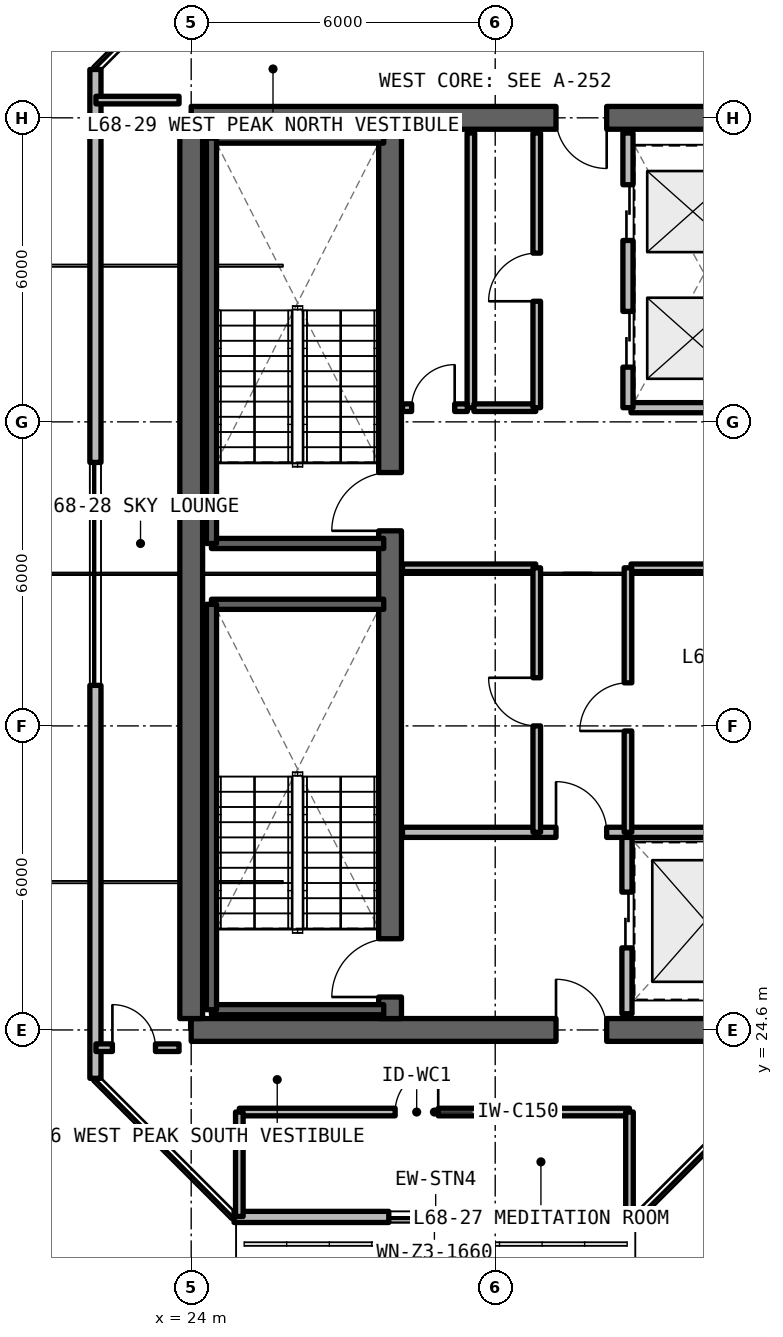
"""IFC4 building model, lengths in metres.
Left out: names, types, materials, properties, quantities, classifications, styles, units other than length and angle.
Written with IfcOpenShell. Run it as: python <this file> out.ifc"""

import sys

from ifc_helpers import new_model, si_unit, direction, frame, frame_2d, origin, place, context, subcontext, project, spatial, rectangle, extrude, element, fill, save


model = new_model("IFC4")
c1 = context("Model", 3, precision=1e-05, world=origin(), true_north=direction((0.0, 1.0)))
c2 = subcontext(c1, "Body", "Model", "MODEL_VIEW")
j1 = project(units=[si_unit("LENGTHUNIT", "METRE"), si_unit("PLANEANGLEUNIT", "RADIAN")], contexts=[c1])
p1 = place(None, origin())
s1 = spatial("IfcSite", under=j1, at=p1, CompositionType="ELEMENT")
p2 = place(p1, origin())
s2 = spatial("IfcBuilding", under=s1, at=p2, CompositionType="ELEMENT")
p3 = place(p2, frame((0.0, 0.0, 242.55)))
s3 = spatial("IfcBuildingStorey", under=s2, at=p3, CompositionType="ELEMENT", Elevation=242.55)
p4 = place(p3, frame((24.0, 24.6, 0.0), z_axis=(0.0, 0.0, 1.0), x_axis=(1.0, 0.0, 0.0)))
e1 = element("IfcWall", 1, at=p4, inside=s3, PredefinedType="SHEAR", context=c2, shape_type="SweptSolid", body=[
    extrude(rectangle(XDim=12.0, YDim=0.45, at=frame_2d((6.0, 0.0))), origin(), (0.0, 0.0, 1.0), 3.63),
])
p5 = place(p4, frame((7.2, 0.0, 0.0)))
e2 = element("IfcOpeningElement", 2, at=p5, cuts=e1, PredefinedType="OPENING", context=c2, shape_type="SweptSolid", body=[
    extrude(rectangle(XDim=1.0, YDim=2.15, at=frame_2d((0.5, 1.075))), frame((0.0, 0.235, 0.0), z_axis=(0.0, -1.0, 0.0), x_axis=(1.0, 0.0, 0.0)), (0.0, 0.0, 1.0), 0.47),
])
p6 = place(p3, frame((36.0, 42.6, 0.0), z_axis=(0.0, 0.0, 1.0), x_axis=(-1.0, 0.0, 0.0)))
e3 = element("IfcWall", 3, at=p6, inside=s3, PredefinedType="SHEAR", context=c2, shape_type="SweptSolid", body=[
    extrude(rectangle(XDim=12.0, YDim=0.45, at=frame_2d((6.0, 0.0))), origin(), (0.0, 0.0, 1.0), 3.63),
])
p7 = place(p6, frame((3.8, 0.0, 0.0)))
e4 = element("IfcOpeningElement", 4, at=p7, cuts=e3, PredefinedType="OPENING", context=c2, shape_type="SweptSolid", body=[
    extrude(rectangle(XDim=1.0, YDim=2.15, at=frame_2d((0.5, 1.075))), frame((0.0, 0.235, 0.0), z_axis=(0.0, -1.0, 0.0), x_axis=(1.0, 0.0, 0.0)), (0.0, 0.0, 1.0), 0.47),
])
p8 = place(p3, frame((24.0, 24.825, 0.0), z_axis=(0.0, 0.0, 1.0), x_axis=(0.0, 1.0, 0.0)))
e5 = element("IfcWall", 5, at=p8, inside=s3, PredefinedType="SHEAR", context=c2, shape_type="SweptSolid", body=[
    extrude(rectangle(XDim=17.55, YDim=0.45, at=frame_2d((8.775, 0.0))), origin(), (0.0, 0.0, 1.0), 3.63),
])
p9 = place(p3, frame((27.925, 24.825, 0.0), z_axis=(0.0, 0.0, 1.0), x_axis=(0.0, 1.0, 0.0)))
e6 = element("IfcWall", 6, at=p9, inside=s3, PredefinedType="SHEAR", context=c2, shape_type="SweptSolid", body=[
    extrude(rectangle(XDim=17.55, YDim=0.45, at=frame_2d((8.775, 0.0))), origin(), (0.0, 0.0, 1.0), 3.63),
])
p10 = place(p9, frame((0.425, 0.0, 0.0)))
e7 = element("IfcOpeningElement", 7, at=p10, cuts=e6, PredefinedType="OPENING", context=c2, shape_type="SweptSolid", body=[
    extrude(rectangle(XDim=1.15, YDim=2.15, at=frame_2d((0.575, 1.075))), frame((0.0, 0.235, 0.0), z_axis=(0.0, -1.0, 0.0), x_axis=(1.0, 0.0, 0.0)), (0.0, 0.0, 1.0), 0.47),
])
p11 = place(p9, frame((9.625, 0.0, 0.0)))
e8 = element("IfcOpeningElement", 8, at=p11, cuts=e6, PredefinedType="OPENING", context=c2, shape_type="SweptSolid", body=[
    extrude(rectangle(XDim=1.15, YDim=2.15, at=frame_2d((0.575, 1.075))), frame((0.0, 0.235, 0.0), z_axis=(0.0, -1.0, 0.0), x_axis=(1.0, 0.0, 0.0)), (0.0, 0.0, 1.0), 0.47),
])
p12 = place(p3, frame((24.846, 20.91, 0.0), z_axis=(0.0, 0.0, 1.0), x_axis=(1.0, 0.0, 0.0)))
e9 = element("IfcWall", 9, at=p12, inside=s3, PredefinedType="SOLIDWALL", context=c2, shape_type="SweptSolid", body=[
    extrude(rectangle(XDim=7.959, YDim=0.22, at=frame_2d((3.979, 0.0))), origin(), (0.0, 0.0, 1.0), 3.41),
])
p13 = place(p12, frame((3.054, 0.0, 0.78)))
e10 = element("IfcOpeningElement", 10, at=p13, cuts=e9, PredefinedType="OPENING", context=c2, shape_type="SweptSolid", body=[
    extrude(rectangle(XDim=1.8, YDim=1.66, at=frame_2d((0.9, 0.83))), frame((0.0, 0.12, 0.0), z_axis=(0.0, -1.0, 0.0), x_axis=(1.0, 0.0, 0.0)), (0.0, 0.0, 1.0), 0.24),
])
p14 = place(p3, frame((22.11, 43.554, 0.0), z_axis=(0.0, 0.0, 1.0), x_axis=(0.0, -1.0, 0.0)))
e11 = element("IfcWall", 11, at=p14, inside=s3, PredefinedType="SOLIDWALL", context=c2, shape_type="SweptSolid", body=[
    extrude(rectangle(XDim=19.909, YDim=0.22, at=frame_2d((9.955, 0.0))), origin(), (0.0, 0.0, 1.0), 3.41),
])
p15 = place(p14, frame((7.754, 0.0, 0.78)))
e12 = element("IfcOpeningElement", 12, at=p15, cuts=e11, PredefinedType="OPENING", context=c2, shape_type="SweptSolid", body=[
    extrude(rectangle(XDim=4.4, YDim=1.66, at=frame_2d((2.2, 0.83))), frame((0.0, 0.12, 0.0), z_axis=(0.0, -1.0, 0.0), x_axis=(1.0, 0.0, 0.0)), (0.0, 0.0, 1.0), 0.24),
])
p16 = place(p3, frame((32.6, 24.92, 0.0), z_axis=(0.0, 0.0, 1.0), x_axis=(0.0, 1.0, 0.0)))
e13 = element("IfcWall", 13, at=p16, inside=s3, PredefinedType="SOLIDWALL", context=c2, shape_type="SweptSolid", body=[
    extrude(rectangle(XDim=3.58, YDim=0.2, at=frame_2d((1.79, 0.0))), origin(), (0.0, 0.0, 1.0), 2.63),
])
p17 = place(p16, frame((1.3, 0.0, 0.0)))
e14 = element("IfcOpeningElement", 14, at=p17, cuts=e13, PredefinedType="OPENING", context=c2, shape_type="SweptSolid", body=[
    extrude(rectangle(XDim=1.1, YDim=2.2, at=frame_2d((0.55, 1.1))), frame((0.0, 0.11, 0.0), z_axis=(0.0, -1.0, 0.0), x_axis=(1.0, 0.0, 0.0)), (0.0, 0.0, 1.0), 0.22),
])
p18 = place(p3, frame((28.17, 28.5, 0.0), z_axis=(0.0, 0.0, 1.0), x_axis=(1.0, 0.0, 0.0)))
e15 = element("IfcWall", 15, at=p18, inside=s3, PredefinedType="SOLIDWALL", context=c2, shape_type="SweptSolid", body=[
    extrude(rectangle(XDim=7.585, YDim=0.2, at=frame_2d((3.792, 0.0))), origin(), (0.0, 0.0, 1.0), 2.63),
])
p19 = place(p18, frame((3.03, 0.0, 0.0)))
e16 = element("IfcOpeningElement", 16, at=p19, cuts=e15, PredefinedType="OPENING", context=c2, shape_type="SweptSolid", body=[
    extrude(rectangle(XDim=1.0, YDim=2.15, at=frame_2d((0.5, 1.075))), frame((0.0, 0.11, 0.0), z_axis=(0.0, -1.0, 0.0), x_axis=(1.0, 0.0, 0.0)), (0.0, 0.0, 1.0), 0.22),
])
p20 = place(p3, frame((28.17, 33.72, 0.0), z_axis=(0.0, 0.0, 1.0), x_axis=(1.0, 0.0, 0.0)))
e17 = element("IfcWall", 17, at=p20, inside=s3, PredefinedType="SOLIDWALL", context=c2, shape_type="SweptSolid", body=[
    extrude(rectangle(XDim=2.63, YDim=0.15, at=frame_2d((1.315, 0.0))), origin(), (0.0, 0.0, 1.0), 2.63),
])
p21 = place(p3, frame((30.82, 28.5, 0.0), z_axis=(0.0, 0.0, 1.0), x_axis=(0.0, 1.0, 0.0)))
e18 = element("IfcWall", 18, at=p21, inside=s3, PredefinedType="SOLIDWALL", context=c2, shape_type="SweptSolid", body=[
    extrude(rectangle(XDim=5.22, YDim=0.15, at=frame_2d((2.61, 0.0))), origin(), (0.0, 0.0, 1.0), 2.63),
])
p22 = place(p21, frame((2.1, 0.0, 0.0)))
e19 = element("IfcOpeningElement", 19, at=p22, cuts=e18, PredefinedType="OPENING", context=c2, shape_type="SweptSolid", body=[
    extrude(rectangle(XDim=0.95, YDim=2.15, at=frame_2d((0.475, 1.075))), frame((0.0, 0.085, 0.0), z_axis=(0.0, -1.0, 0.0), x_axis=(1.0, 0.0, 0.0)), (0.0, 0.0, 1.0), 0.17),
])
p23 = place(p3, frame((32.68, 33.72, 0.0), z_axis=(0.0, 0.0, 1.0), x_axis=(1.0, 0.0, 0.0)))
e20 = element("IfcWall", 20, at=p23, inside=s3, PredefinedType="SOLIDWALL", context=c2, shape_type="SweptSolid", body=[
    extrude(rectangle(XDim=3.075, YDim=0.15, at=frame_2d((1.538, 0.0))), origin(), (0.0, 0.0, 1.0), 2.63),
])
p24 = place(p3, frame((32.62, 28.5, 0.0), z_axis=(0.0, 0.0, 1.0), x_axis=(0.0, 1.0, 0.0)))
e21 = element("IfcWall", 21, at=p24, inside=s3, PredefinedType="SOLIDWALL", context=c2, shape_type="SweptSolid", body=[
    extrude(rectangle(XDim=5.22, YDim=0.15, at=frame_2d((2.61, 0.0))), origin(), (0.0, 0.0, 1.0), 2.63),
])
p25 = place(p24, frame((2.0, 0.0, 0.0)))
e22 = element("IfcOpeningElement", 22, at=p25, cuts=e21, PredefinedType="OPENING", context=c2, shape_type="SweptSolid", body=[
    extrude(rectangle(XDim=0.95, YDim=2.15, at=frame_2d((0.475, 1.075))), frame((0.0, 0.085, 0.0), z_axis=(0.0, -1.0, 0.0), x_axis=(1.0, 0.0, 0.0)), (0.0, 0.0, 1.0), 0.17),
])
p26 = place(p3, frame((29.52, 36.88, 0.0), z_axis=(0.0, 0.0, 1.0), x_axis=(0.0, 1.0, 0.0)))
e23 = element("IfcWall", 23, at=p26, inside=s3, PredefinedType="SOLIDWALL", context=c2, shape_type="SweptSolid", body=[
    extrude(rectangle(XDim=5.42, YDim=0.15, at=frame_2d((2.71, 0.0))), origin(), (0.0, 0.0, 1.0), 2.63),
])
p27 = place(p3, frame((28.17, 36.88, 0.0), z_axis=(0.0, 0.0, 1.0), x_axis=(1.0, 0.0, 0.0)))
e24 = element("IfcWall", 24, at=p27, inside=s3, PredefinedType="SOLIDWALL", context=c2, shape_type="SweptSolid", body=[
    extrude(rectangle(XDim=1.28, YDim=0.15, at=frame_2d((0.64, 0.0))), origin(), (0.0, 0.0, 1.0), 2.63),
])
p28 = place(p27, frame((0.18, 0.0, 0.0)))
e25 = element("IfcOpeningElement", 25, at=p28, cuts=e24, PredefinedType="OPENING", context=c2, shape_type="SweptSolid", body=[
    extrude(rectangle(XDim=0.85, YDim=2.1, at=frame_2d((0.425, 1.05))), frame((0.0, 0.085, 0.0), z_axis=(0.0, -1.0, 0.0), x_axis=(1.0, 0.0, 0.0)), (0.0, 0.0, 1.0), 0.17),
])
p29 = place(p3, frame((29.58, 36.88, 0.0), z_axis=(0.0, 0.0, 1.0), x_axis=(1.0, 0.0, 0.0)))
e26 = element("IfcWall", 26, at=p29, inside=s3, PredefinedType="SOLIDWALL", context=c2, shape_type="SweptSolid", body=[
    extrude(rectangle(XDim=1.22, YDim=0.15, at=frame_2d((0.61, 0.0))), origin(), (0.0, 0.0, 1.0), 2.63),
])
p30 = place(p3, frame((30.82, 36.88, 0.0), z_axis=(0.0, 0.0, 1.0), x_axis=(0.0, 1.0, 0.0)))
e27 = element("IfcWall", 27, at=p30, inside=s3, PredefinedType="SOLIDWALL", context=c2, shape_type="SweptSolid", body=[
    extrude(rectangle(XDim=5.42, YDim=0.15, at=frame_2d((2.71, 0.0))), origin(), (0.0, 0.0, 1.0), 2.63),
])
p31 = place(p30, frame((2.1, 0.0, 0.0)))
e28 = element("IfcOpeningElement", 28, at=p31, cuts=e27, PredefinedType="OPENING", context=c2, shape_type="SweptSolid", body=[
    extrude(rectangle(XDim=0.95, YDim=2.15, at=frame_2d((0.475, 1.075))), frame((0.0, 0.085, 0.0), z_axis=(0.0, -1.0, 0.0), x_axis=(1.0, 0.0, 0.0)), (0.0, 0.0, 1.0), 0.17),
])
p32 = place(p3, frame((32.68, 36.88, 0.0), z_axis=(0.0, 0.0, 1.0), x_axis=(1.0, 0.0, 0.0)))
e29 = element("IfcWall", 29, at=p32, inside=s3, PredefinedType="SOLIDWALL", context=c2, shape_type="SweptSolid", body=[
    extrude(rectangle(XDim=3.075, YDim=0.2, at=frame_2d((1.538, 0.0))), origin(), (0.0, 0.0, 1.0), 2.63),
])
p33 = place(p3, frame((32.62, 36.88, 0.0), z_axis=(0.0, 0.0, 1.0), x_axis=(0.0, 1.0, 0.0)))
e30 = element("IfcWall", 30, at=p33, inside=s3, PredefinedType="SOLIDWALL", context=c2, shape_type="SweptSolid", body=[
    extrude(rectangle(XDim=5.42, YDim=0.2, at=frame_2d((2.71, 0.0))), origin(), (0.0, 0.0, 1.0), 2.63),
])
p34 = place(p33, frame((0.8, 0.0, 0.0)))
e31 = element("IfcOpeningElement", 31, at=p34, cuts=e30, PredefinedType="OPENING", context=c2, shape_type="SweptSolid", body=[
    extrude(rectangle(XDim=1.1, YDim=2.2, at=frame_2d((0.55, 1.1))), frame((0.0, 0.11, 0.0), z_axis=(0.0, -1.0, 0.0), x_axis=(1.0, 0.0, 0.0)), (0.0, 0.0, 1.0), 0.22),
])
p35 = place(p33, frame((3.3, 0.0, 0.0)))
e32 = element("IfcOpeningElement", 32, at=p35, cuts=e30, PredefinedType="OPENING", context=c2, shape_type="SweptSolid", body=[
    extrude(rectangle(XDim=1.1, YDim=2.2, at=frame_2d((0.55, 1.1))), frame((0.0, 0.11, 0.0), z_axis=(0.0, -1.0, 0.0), x_axis=(1.0, 0.0, 0.0)), (0.0, 0.0, 1.0), 0.22),
])
p36 = place(p3, frame((24.95, 22.98, 0.0), z_axis=(0.0, 0.0, 1.0), x_axis=(1.0, 0.0, 0.0)))
e33 = element("IfcWall", 33, at=p36, inside=s3, PredefinedType="SOLIDWALL", context=c2, shape_type="SweptSolid", body=[
    extrude(rectangle(XDim=7.7, YDim=0.15, at=frame_2d((3.85, 0.0))), origin(), (0.0, 0.0, 1.0), 2.63),
])
p37 = place(p36, frame((3.075, 0.0, 0.0)))
e34 = element("IfcOpeningElement", 34, at=p37, cuts=e33, PredefinedType="OPENING", context=c2, shape_type="SweptSolid", body=[
    extrude(rectangle(XDim=0.85, YDim=2.1, at=frame_2d((0.425, 1.05))), frame((0.0, 0.085, 0.0), z_axis=(0.0, -1.0, 0.0), x_axis=(1.0, 0.0, 0.0)), (0.0, 0.0, 1.0), 0.17),
])
for number, where, z_axis, x_axis in (
    (35, (24.95, 20.92, 0.0), (0.0, 0.0, 1.0), (0.0, 1.0, 0.0)),
    (36, (32.65, 20.92, 0.0), (0.0, 0.0, 1.0), (0.0, 1.0, 0.0)),
):
    element("IfcWall", number, at=place(p3, frame(where, z_axis=z_axis, x_axis=x_axis)), inside=s3, PredefinedType="SOLIDWALL", context=c2, shape_type="SweptSolid", body=[
        extrude(rectangle(XDim=2.06, YDim=0.15, at=frame_2d((1.03, 0.0))), origin(), (0.0, 0.0, 1.0), 2.63),
    ])
p38 = place(p3, frame((22.12, 24.25, 0.0), z_axis=(0.0, 0.0, 1.0), x_axis=(1.0, 0.0, 0.0)))
e37 = element("IfcWall", 37, at=p38, inside=s3, PredefinedType="SOLIDWALL", context=c2, shape_type="SweptSolid", body=[
    extrude(rectangle(XDim=1.64, YDim=0.15, at=frame_2d((0.82, 0.0))), origin(), (0.0, 0.0, 1.0), 2.63),
])
p39 = place(p38, frame((0.325, 0.0, 0.0)))
e38 = element("IfcOpeningElement", 38, at=p39, cuts=e37, PredefinedType="OPENING", context=c2, shape_type="SweptSolid", body=[
    extrude(rectangle(XDim=0.85, YDim=2.1, at=frame_2d((0.425, 1.05))), frame((0.0, 0.085, 0.0), z_axis=(0.0, -1.0, 0.0), x_axis=(1.0, 0.0, 0.0)), (0.0, 0.0, 1.0), 0.17),
])
p40 = place(p3, frame((22.12, 42.95, 0.0), z_axis=(0.0, 0.0, 1.0), x_axis=(1.0, 0.0, 0.0)))
e39 = element("IfcWall", 39, at=p40, inside=s3, PredefinedType="SOLIDWALL", context=c2, shape_type="SweptSolid", body=[
    extrude(rectangle(XDim=1.64, YDim=0.15, at=frame_2d((0.82, 0.0))), origin(), (0.0, 0.0, 1.0), 2.63),
])
for number, where, z_axis, x_axis in (
    (40, (24.4, 25.0, 0.0), (0.0, 0.0, 1.0), (1.0, 0.0, 0.0)),
    (41, (27.8, 33.0, 0.0), (0.0, 0.0, 1.0), (-1.0, 0.0, 0.0)),
):
    element("IfcWall", number, at=place(p3, frame(where, z_axis=z_axis, x_axis=x_axis)), inside=s3, PredefinedType="SOLIDWALL", context=c2, shape_type="SweptSolid", body=[
        extrude(rectangle(XDim=3.4, YDim=0.2, at=frame_2d((1.7, 0.0))), origin(), (0.0, 0.0, 1.0), 3.63),
    ])
p41 = place(p3, frame((24.4, 33.0, 0.0), z_axis=(0.0, 0.0, 1.0), x_axis=(0.0, -1.0, 0.0)))
e42 = element("IfcWall", 42, at=p41, inside=s3, PredefinedType="SOLIDWALL", context=c2, shape_type="SweptSolid", body=[
    extrude(rectangle(XDim=8.0, YDim=0.2, at=frame_2d((4.0, 0.0))), origin(), (0.0, 0.0, 1.0), 3.63),
])
for number, where, z_axis, x_axis in (
    (43, (24.4, 34.2, 0.0), (0.0, 0.0, 1.0), (1.0, 0.0, 0.0)),
    (44, (27.8, 42.2, 0.0), (0.0, 0.0, 1.0), (-1.0, 0.0, 0.0)),
):
    element("IfcWall", number, at=place(p3, frame(where, z_axis=z_axis, x_axis=x_axis)), inside=s3, PredefinedType="SOLIDWALL", context=c2, shape_type="SweptSolid", body=[
        extrude(rectangle(XDim=3.4, YDim=0.2, at=frame_2d((1.7, 0.0))), origin(), (0.0, 0.0, 1.0), 3.63),
    ])
p42 = place(p3, frame((24.4, 42.2, 0.0), z_axis=(0.0, 0.0, 1.0), x_axis=(0.0, -1.0, 0.0)))
e45 = element("IfcWall", 45, at=p42, inside=s3, PredefinedType="SOLIDWALL", context=c2, shape_type="SweptSolid", body=[
    extrude(rectangle(XDim=8.0, YDim=0.2, at=frame_2d((4.0, 0.0))), origin(), (0.0, 0.0, 1.0), 3.63),
])
p43 = place(p13, origin())
e46 = element("IfcWindow", 46, at=p43, inside=s3, PartitioningType="SINGLE_PANEL", PredefinedType="WINDOW", context=c2, shape_type="SweptSolid", body=[
    extrude(rectangle(XDim=1.8, YDim=1.66, at=frame_2d((0.9, 0.83))), frame((0.0, 0.03, 0.0), z_axis=(0.0, -1.0, 0.0), x_axis=(1.0, 0.0, 0.0)), (0.0, 0.0, 1.0), 0.06),
])
fill(e10, e46)
p44 = place(p15, origin())
e47 = element("IfcWindow", 47, at=p44, inside=s3, PartitioningType="SINGLE_PANEL", PredefinedType="WINDOW", context=c2, shape_type="SweptSolid", body=[
    extrude(rectangle(XDim=4.4, YDim=1.66, at=frame_2d((2.2, 0.83))), frame((0.0, 0.03, 0.0), z_axis=(0.0, -1.0, 0.0), x_axis=(1.0, 0.0, 0.0)), (0.0, 0.0, 1.0), 0.06),
])
fill(e12, e47)
p45 = place(p17, origin())
e48 = element("IfcDoor", 48, at=p45, inside=s3, OperationType="SLIDING_TO_LEFT", PredefinedType="DOOR", context=c2, shape_type="SweptSolid", body=[
    extrude(rectangle(XDim=1.1, YDim=2.2, at=frame_2d((0.55, 1.1))), frame((0.0, 0.025, 0.0), z_axis=(0.0, -1.0, 0.0), x_axis=(1.0, 0.0, 0.0)), (0.0, 0.0, 1.0), 0.05),
])
fill(e14, e48)
p46 = place(p19, origin())
e49 = element("IfcDoor", 49, at=p46, inside=s3, OperationType="SINGLE_SWING_LEFT", PredefinedType="DOOR", context=c2, shape_type="SweptSolid", body=[
    extrude(rectangle(XDim=1.0, YDim=2.15, at=frame_2d((0.5, 1.075))), frame((0.0, 0.025, 0.0), z_axis=(0.0, -1.0, 0.0), x_axis=(1.0, 0.0, 0.0)), (0.0, 0.0, 1.0), 0.05),
])
fill(e16, e49)
p47 = place(p22, origin())
e50 = element("IfcDoor", 50, at=p47, inside=s3, OperationType="SINGLE_SWING_RIGHT", PredefinedType="DOOR", context=c2, shape_type="SweptSolid", body=[
    extrude(rectangle(XDim=0.95, YDim=2.15, at=frame_2d((0.475, 1.075))), frame((0.0, 0.025, 0.0), z_axis=(0.0, -1.0, 0.0), x_axis=(1.0, 0.0, 0.0)), (0.0, 0.0, 1.0), 0.05),
])
fill(e19, e50)
p48 = place(p25, origin())
e51 = element("IfcDoor", 51, at=p48, inside=s3, OperationType="SINGLE_SWING_LEFT", PredefinedType="DOOR", context=c2, shape_type="SweptSolid", body=[
    extrude(rectangle(XDim=0.95, YDim=2.15, at=frame_2d((0.475, 1.075))), frame((0.0, 0.025, 0.0), z_axis=(0.0, -1.0, 0.0), x_axis=(1.0, 0.0, 0.0)), (0.0, 0.0, 1.0), 0.05),
])
fill(e22, e51)
p49 = place(p28, origin())
e52 = element("IfcDoor", 52, at=p49, inside=s3, OperationType="SINGLE_SWING_RIGHT", PredefinedType="DOOR", context=c2, shape_type="SweptSolid", body=[
    extrude(rectangle(XDim=0.85, YDim=2.1, at=frame_2d((0.425, 1.05))), frame((0.0, 0.025, 0.0), z_axis=(0.0, -1.0, 0.0), x_axis=(1.0, 0.0, 0.0)), (0.0, 0.0, 1.0), 0.05),
])
fill(e25, e52)
p50 = place(p31, origin())
e53 = element("IfcDoor", 53, at=p50, inside=s3, OperationType="SINGLE_SWING_LEFT", PredefinedType="DOOR", context=c2, shape_type="SweptSolid", body=[
    extrude(rectangle(XDim=0.95, YDim=2.15, at=frame_2d((0.475, 1.075))), frame((0.0, 0.025, 0.0), z_axis=(0.0, -1.0, 0.0), x_axis=(1.0, 0.0, 0.0)), (0.0, 0.0, 1.0), 0.05),
])
fill(e28, e53)
p51 = place(p34, origin())
e54 = element("IfcDoor", 54, at=p51, inside=s3, OperationType="SLIDING_TO_LEFT", PredefinedType="DOOR", context=c2, shape_type="SweptSolid", body=[
    extrude(rectangle(XDim=1.1, YDim=2.2, at=frame_2d((0.55, 1.1))), frame((0.0, 0.025, 0.0), z_axis=(0.0, -1.0, 0.0), x_axis=(1.0, 0.0, 0.0)), (0.0, 0.0, 1.0), 0.05),
])
fill(e31, e54)
p52 = place(p35, origin())
e55 = element("IfcDoor", 55, at=p52, inside=s3, OperationType="SLIDING_TO_RIGHT", PredefinedType="DOOR", context=c2, shape_type="SweptSolid", body=[
    extrude(rectangle(XDim=1.1, YDim=2.2, at=frame_2d((0.55, 1.1))), frame((0.0, 0.025, 0.0), z_axis=(0.0, -1.0, 0.0), x_axis=(1.0, 0.0, 0.0)), (0.0, 0.0, 1.0), 0.05),
])
fill(e32, e55)
p53 = place(p37, origin())
e56 = element("IfcDoor", 56, at=p53, inside=s3, OperationType="SINGLE_SWING_RIGHT", PredefinedType="DOOR", context=c2, shape_type="SweptSolid", body=[
    extrude(rectangle(XDim=0.85, YDim=2.1, at=frame_2d((0.425, 1.05))), frame((0.0, 0.025, 0.0), z_axis=(0.0, -1.0, 0.0), x_axis=(1.0, 0.0, 0.0)), (0.0, 0.0, 1.0), 0.05),
])
fill(e34, e56)
p54 = place(p39, origin())
e57 = element("IfcDoor", 57, at=p54, inside=s3, OperationType="SINGLE_SWING_LEFT", PredefinedType="DOOR", context=c2, shape_type="SweptSolid", body=[
    extrude(rectangle(XDim=0.85, YDim=2.1, at=frame_2d((0.425, 1.05))), frame((0.0, 0.025, 0.0), z_axis=(0.0, -1.0, 0.0), x_axis=(1.0, 0.0, 0.0)), (0.0, 0.0, 1.0), 0.05),
])
fill(e38, e57)
p55 = place(p10, origin())
e58 = element("IfcDoor", 58, at=p55, inside=s3, OperationType="SINGLE_SWING_LEFT", PredefinedType="DOOR", context=c2, shape_type="SweptSolid", body=[
    extrude(rectangle(XDim=1.15, YDim=2.15, at=frame_2d((0.575, 1.075))), frame((0.0, 0.025, 0.0), z_axis=(0.0, -1.0, 0.0), x_axis=(1.0, 0.0, 0.0)), (0.0, 0.0, 1.0), 0.05),
])
fill(e7, e58)
p56 = place(p11, origin())
e59 = element("IfcDoor", 59, at=p56, inside=s3, OperationType="SINGLE_SWING_RIGHT", PredefinedType="DOOR", context=c2, shape_type="SweptSolid", body=[
    extrude(rectangle(XDim=1.15, YDim=2.15, at=frame_2d((0.575, 1.075))), frame((0.0, 0.025, 0.0), z_axis=(0.0, -1.0, 0.0), x_axis=(1.0, 0.0, 0.0)), (0.0, 0.0, 1.0), 0.05),
])
fill(e8, e59)
p57 = place(p5, origin())
e60 = element("IfcDoor", 60, at=p57, inside=s3, OperationType="SINGLE_SWING_LEFT", PredefinedType="DOOR", context=c2, shape_type="SweptSolid", body=[
    extrude(rectangle(XDim=1.0, YDim=2.15, at=frame_2d((0.5, 1.075))), frame((0.0, 0.025, 0.0), z_axis=(0.0, -1.0, 0.0), x_axis=(1.0, 0.0, 0.0)), (0.0, 0.0, 1.0), 0.05),
])
fill(e2, e60)
p58 = place(p7, origin())
e61 = element("IfcDoor", 61, at=p58, inside=s3, OperationType="SINGLE_SWING_RIGHT", PredefinedType="DOOR", context=c2, shape_type="SweptSolid", body=[
    extrude(rectangle(XDim=1.0, YDim=2.15, at=frame_2d((0.5, 1.075))), frame((0.0, 0.025, 0.0), z_axis=(0.0, -1.0, 0.0), x_axis=(1.0, 0.0, 0.0)), (0.0, 0.0, 1.0), 0.05),
])
fill(e4, e61)
save(model, sys.argv[1])
